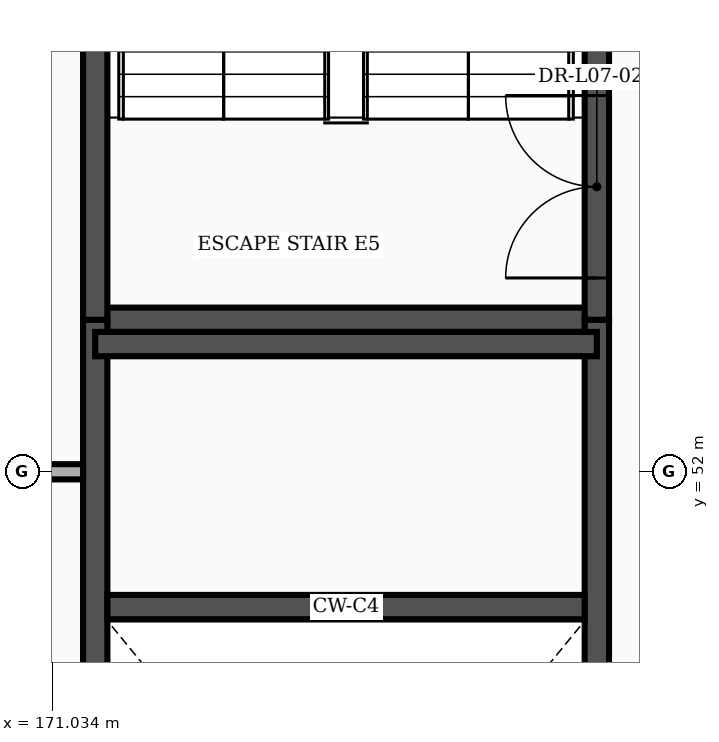
"""IFC4 building model, lengths in metres.
Left out: names, types, materials, properties, quantities, classifications, styles, units other than length and angle.
Written with IfcOpenShell. Run it as: python <this file> out.ifc"""

import sys

from ifc_helpers import new_model, si_unit, direction, frame, frame_2d, origin, place, context, subcontext, project, spatial, rectangle, extrude, element, fill, save


model = new_model("IFC4")
c1 = context("Model", 3, precision=1e-05, world=origin(), true_north=direction((0.0, 1.0)))
c2 = subcontext(c1, "Body", "Model", "MODEL_VIEW")
j1 = project(units=[si_unit("LENGTHUNIT", "METRE"), si_unit("PLANEANGLEUNIT", "RADIAN")], contexts=[c1])
p1 = place(None, origin())
s1 = spatial("IfcSite", under=j1, at=p1, CompositionType="ELEMENT")
p2 = place(p1, origin())
s2 = spatial("IfcBuilding", under=s1, at=p2, CompositionType="ELEMENT")
p3 = place(p2, frame((0.0, 0.0, 33.3)))
s3 = spatial("IfcBuildingStorey", under=s2, at=p3, CompositionType="ELEMENT", Elevation=33.3)
p4 = place(p3, frame((171.6, 54.0, 0.0), z_axis=(0.0, 0.0, 1.0), x_axis=(1.0, 0.0, 0.0)))
e1 = element("IfcWall", 1, at=p4, inside=s3, PredefinedType="SHEAR", context=c2, shape_type="SweptSolid", body=[
    extrude(rectangle(XDim=6.6, YDim=0.32, at=frame_2d((3.3, 0.0))), origin(), (0.0, 0.0, 1.0), 4.255),
])
p5 = place(p3, frame((171.6, 39.4, 0.0), z_axis=(0.0, 0.0, 1.0), x_axis=(0.0, 1.0, 0.0)))
e2 = element("IfcWall", 2, at=p5, inside=s3, PredefinedType="SHEAR", context=c2, shape_type="SweptSolid", body=[
    extrude(rectangle(XDim=14.6, YDim=0.32, at=frame_2d((7.3, 0.0))), origin(), (0.0, 0.0, 1.0), 4.255),
])
p6 = place(p3, frame((178.2, 39.4, 0.0), z_axis=(0.0, 0.0, 1.0), x_axis=(0.0, 1.0, 0.0)))
e3 = element("IfcWall", 3, at=p6, inside=s3, PredefinedType="SHEAR", context=c2, shape_type="SweptSolid", body=[
    extrude(rectangle(XDim=14.6, YDim=0.32, at=frame_2d((7.3, 0.0))), origin(), (0.0, 0.0, 1.0), 4.255),
])
p7 = place(p6, frame((0.55, 0.0, 0.0)))
e4 = element("IfcOpeningElement", 4, at=p7, cuts=e3, PredefinedType="OPENING", context=c2, shape_type="SweptSolid", body=[
    extrude(rectangle(XDim=2.4, YDim=2.25, at=frame_2d((1.2, 1.125))), frame((0.0, 0.172, 0.0), z_axis=(0.0, -1.0, 0.0), x_axis=(1.0, 0.0, 0.0)), (0.0, 0.0, 1.0), 0.344),
])
p8 = place(p3, frame((171.76, 50.22, 0.0), z_axis=(0.0, 0.0, 1.0), x_axis=(1.0, 0.0, 0.0)))
e5 = element("IfcWall", 5, at=p8, inside=s3, PredefinedType="SHEAR", context=c2, shape_type="SweptSolid", body=[
    extrude(rectangle(XDim=6.28, YDim=0.32, at=frame_2d((3.14, 0.0))), origin(), (0.0, 0.0, 1.0), 4.255),
])
p9 = place(p3, frame((171.6, 53.68, 0.0), z_axis=(0.0, 0.0, 1.0), x_axis=(1.0, 0.0, 0.0)))
e6 = element("IfcWall", 6, at=p9, inside=s3, PredefinedType="SHEAR", context=c2, shape_type="SweptSolid", body=[
    extrude(rectangle(XDim=6.6, YDim=0.32, at=frame_2d((3.3, 0.0))), origin(), (0.0, 0.0, 1.0), 4.255),
])
p10 = place(p3, frame((171.6, 54.0, 0.0), z_axis=(0.0, 0.0, 1.0), x_axis=(0.0, 1.0, 0.0)))
e7 = element("IfcWall", 7, at=p10, inside=s3, PredefinedType="SHEAR", context=c2, shape_type="SweptSolid", body=[
    extrude(rectangle(XDim=12.0, YDim=0.32, at=frame_2d((6.0, 0.0))), origin(), (0.0, 0.0, 1.0), 4.255),
])
p11 = place(p3, frame((178.2, 54.0, 0.0), z_axis=(0.0, 0.0, 1.0), x_axis=(0.0, 1.0, 0.0)))
e8 = element("IfcWall", 8, at=p11, inside=s3, PredefinedType="SHEAR", context=c2, shape_type="SweptSolid", body=[
    extrude(rectangle(XDim=12.0, YDim=0.32, at=frame_2d((6.0, 0.0))), origin(), (0.0, 0.0, 1.0), 4.255),
])
p12 = place(p11, frame((0.55, 0.0, 0.0)))
e9 = element("IfcOpeningElement", 9, at=p12, cuts=e8, PredefinedType="OPENING", context=c2, shape_type="SweptSolid", body=[
    extrude(rectangle(XDim=2.4, YDim=2.25, at=frame_2d((1.2, 1.125))), frame((0.0, 0.172, 0.0), z_axis=(0.0, -1.0, 0.0), x_axis=(1.0, 0.0, 0.0)), (0.0, 0.0, 1.0), 0.344),
])
p13 = place(p3, frame((153.17, 52.0, 0.0), z_axis=(0.0, 0.0, 1.0), x_axis=(1.0, 0.0, 0.0)))
e10 = element("IfcWall", 10, at=p13, inside=s3, PredefinedType="PARTITIONING", context=c2, shape_type="SweptSolid", body=[
    extrude(rectangle(XDim=18.27, YDim=0.2, at=frame_2d((9.135, 0.0))), origin(), (0.0, 0.0, 1.0), 3.868),
])
p14 = place(p13, frame((0.91, 0.0, 0.0)))
e11 = element("IfcOpeningElement", 11, at=p14, cuts=e10, PredefinedType="OPENING", context=c2, shape_type="SweptSolid", body=[
    extrude(rectangle(XDim=1.9, YDim=2.35, at=frame_2d((0.95, 1.175))), frame((0.0, 0.112, 0.0), z_axis=(0.0, -1.0, 0.0), x_axis=(1.0, 0.0, 0.0)), (0.0, 0.0, 1.0), 0.224),
])
p15 = place(p12, origin())
e12 = element("IfcDoor", 12, at=p15, inside=s3, OperationType="DOUBLE_DOOR_SINGLE_SWING", PredefinedType="DOOR", context=c2, shape_type="SweptSolid", body=[
    extrude(rectangle(XDim=2.4, YDim=2.25, at=frame_2d((1.2, 1.125))), frame((0.0, 0.025, 0.0), z_axis=(0.0, -1.0, 0.0), x_axis=(1.0, 0.0, 0.0)), (0.0, 0.0, 1.0), 0.05),
])
fill(e9, e12)
save(model, sys.argv[1])
